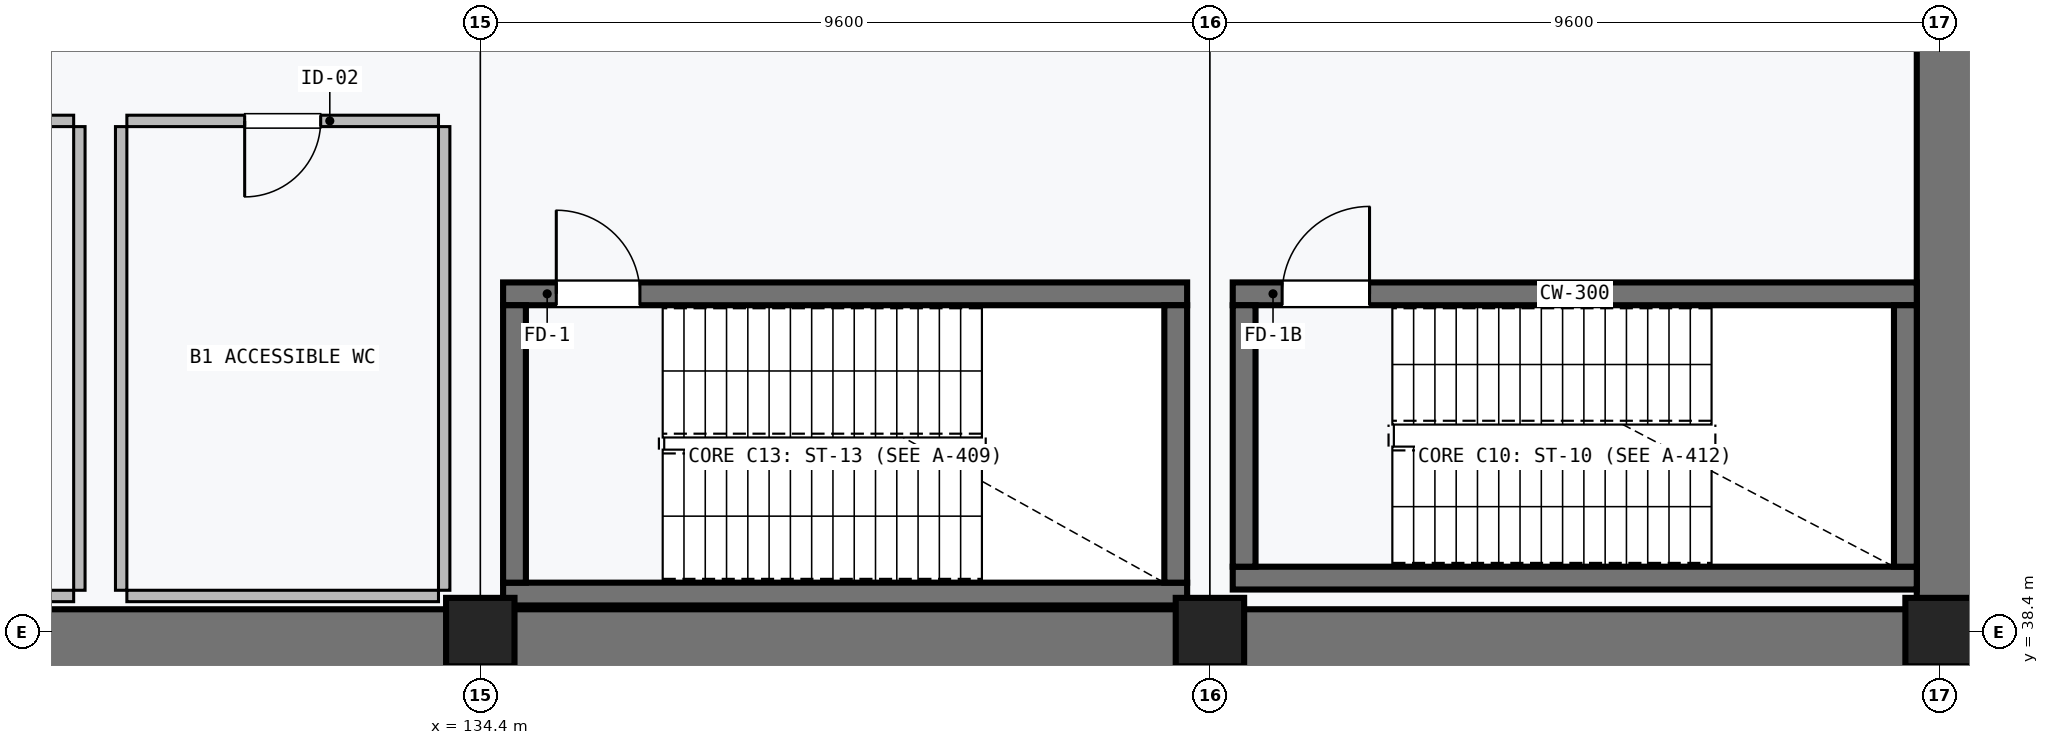
"""IFC4 building model, lengths in metres.
Left out: names, types, materials, properties, quantities, classifications, styles, units other than length and angle.
Written with IfcOpenShell. Run it as: python <this file> out.ifc"""

import sys

from ifc_helpers import new_model, si_unit, direction, frame, frame_2d, origin, origin_2d, place, context, subcontext, project, spatial, rectangle, extrude, element, fill, save


model = new_model("IFC4")
c1 = context("Model", 3, precision=1e-05, world=origin(), true_north=direction((0.0, 1.0)))
c2 = subcontext(c1, "Body", "Model", "MODEL_VIEW")
j1 = project(units=[si_unit("LENGTHUNIT", "METRE"), si_unit("PLANEANGLEUNIT", "RADIAN")], contexts=[c1])
p1 = place(None, origin())
s1 = spatial("IfcSite", under=j1, at=p1, CompositionType="ELEMENT")
p2 = place(p1, origin())
s2 = spatial("IfcBuilding", under=s1, at=p2, CompositionType="ELEMENT")
p3 = place(p2, frame((0.0, 0.0, -5.4)))
s3 = spatial("IfcBuildingStorey", under=s2, at=p3, CompositionType="ELEMENT", Elevation=-5.4)
p4 = place(p3, frame((153.7, 76.9, 0.0), z_axis=(0.0, 0.0, 1.0), x_axis=(0.0, -1.0, 0.0)))
e1 = element("IfcWall", 1, at=p4, inside=s3, PredefinedType="SOLIDWALL", context=c2, shape_type="SweptSolid", body=[
    extrude(rectangle(XDim=38.6, YDim=0.8, at=frame_2d((19.3, 0.0))), origin(), (0.0, 0.0, 1.0), 5.0),
])
p5 = place(p3, frame((153.7, 38.3, 0.0), z_axis=(0.0, 0.0, 1.0), x_axis=(-1.0, 0.0, 0.0)))
e2 = element("IfcWall", 2, at=p5, inside=s3, PredefinedType="SOLIDWALL", context=c2, shape_type="SweptSolid", body=[
    extrude(rectangle(XDim=96.0, YDim=0.8, at=frame_2d((48.0, 0.0))), origin(), (0.0, 0.0, 1.0), 5.0),
])
for number, where, z_axis, x_axis in (
    (3, (134.4, 38.4, 0.0), (0.0, 0.0, 1.0), (1.0, 0.0, 0.0)),
    (4, (144.0, 38.4, 0.0), (0.0, 0.0, 1.0), (1.0, 0.0, 0.0)),
    (5, (153.6, 38.4, 0.0), (0.0, 0.0, 1.0), (1.0, 0.0, 0.0)),
):
    element("IfcColumn", number, at=place(p3, frame(where, z_axis=z_axis, x_axis=x_axis)), inside=s3, PredefinedType="COLUMN", context=c2, shape_type="SweptSolid", body=[
        extrude(rectangle(XDim=0.9, YDim=0.9, at=origin_2d()), origin(), (0.0, 0.0, 1.0), 5.0),
    ])
p6 = place(p3, frame((144.3, 39.11, 0.0), z_axis=(0.0, 0.0, 1.0), x_axis=(1.0, 0.0, 0.0)))
e6 = element("IfcWall", 6, at=p6, inside=s3, PredefinedType="SHEAR", context=c2, shape_type="SweptSolid", body=[
    extrude(rectangle(XDim=9.0, YDim=0.3, at=frame_2d((4.5, 0.0))), origin(), (0.0, 0.0, 1.0), 5.0),
])
p7 = place(p3, frame((153.3, 42.85, 0.0), z_axis=(0.0, 0.0, 1.0), x_axis=(-1.0, 0.0, 0.0)))
e7 = element("IfcWall", 7, at=p7, inside=s3, PredefinedType="SHEAR", context=c2, shape_type="SweptSolid", body=[
    extrude(rectangle(XDim=9.0, YDim=0.3, at=frame_2d((4.5, 0.0))), origin(), (0.0, 0.0, 1.0), 5.0),
])
p8 = place(p7, frame((7.2, 0.0, 0.0)))
e8 = element("IfcOpeningElement", 8, at=p8, cuts=e7, PredefinedType="OPENING", context=c2, shape_type="SweptSolid", body=[
    extrude(rectangle(XDim=1.15, YDim=2.15, at=frame_2d((0.575, 1.075))), frame((0.0, 0.16, 0.0), z_axis=(0.0, -1.0, 0.0), x_axis=(1.0, 0.0, 0.0)), (0.0, 0.0, 1.0), 0.32),
])
for number, where, z_axis, x_axis in (
    (9, (144.45, 39.26, 0.0), (0.0, 0.0, 1.0), (0.0, 1.0, 0.0)),
    (10, (153.15, 42.7, 0.0), (0.0, 0.0, 1.0), (0.0, -1.0, 0.0)),
):
    element("IfcWall", number, at=place(p3, frame(where, z_axis=z_axis, x_axis=x_axis)), inside=s3, PredefinedType="SHEAR", context=c2, shape_type="SweptSolid", body=[
        extrude(rectangle(XDim=3.44, YDim=0.3, at=frame_2d((1.72, 0.0))), origin(), (0.0, 0.0, 1.0), 5.0),
    ])
p9 = place(p3, frame((134.7, 38.9, 0.0), z_axis=(0.0, 0.0, 1.0), x_axis=(1.0, 0.0, 0.0)))
e11 = element("IfcWall", 11, at=p9, inside=s3, PredefinedType="SHEAR", context=c2, shape_type="SweptSolid", body=[
    extrude(rectangle(XDim=9.0, YDim=0.3, at=frame_2d((4.5, 0.0))), origin(), (0.0, 0.0, 1.0), 5.0),
])
p10 = place(p3, frame((143.7, 42.85, 0.0), z_axis=(0.0, 0.0, 1.0), x_axis=(-1.0, 0.0, 0.0)))
e12 = element("IfcWall", 12, at=p10, inside=s3, PredefinedType="SHEAR", context=c2, shape_type="SweptSolid", body=[
    extrude(rectangle(XDim=9.0, YDim=0.3, at=frame_2d((4.5, 0.0))), origin(), (0.0, 0.0, 1.0), 5.0),
])
p11 = place(p10, frame((7.2, 0.0, 0.0)))
e13 = element("IfcOpeningElement", 13, at=p11, cuts=e12, PredefinedType="OPENING", context=c2, shape_type="SweptSolid", body=[
    extrude(rectangle(XDim=1.1, YDim=2.15, at=frame_2d((0.55, 1.075))), frame((0.0, 0.16, 0.0), z_axis=(0.0, -1.0, 0.0), x_axis=(1.0, 0.0, 0.0)), (0.0, 0.0, 1.0), 0.32),
])
for number, where, z_axis, x_axis in (
    (14, (134.85, 39.05, 0.0), (0.0, 0.0, 1.0), (0.0, 1.0, 0.0)),
    (15, (143.55, 42.7, 0.0), (0.0, 0.0, 1.0), (0.0, -1.0, 0.0)),
):
    element("IfcWall", number, at=place(p3, frame(where, z_axis=z_axis, x_axis=x_axis)), inside=s3, PredefinedType="SHEAR", context=c2, shape_type="SweptSolid", body=[
        extrude(rectangle(XDim=3.65, YDim=0.3, at=frame_2d((1.825, 0.0))), origin(), (0.0, 0.0, 1.0), 5.0),
    ])
p12 = place(p3, frame((129.05, 38.875, 0.0), z_axis=(0.0, 0.0, 1.0), x_axis=(-1.0, 0.0, 0.0)))
e16 = element("IfcWall", 16, at=p12, inside=s3, PredefinedType="PLUMBINGWALL", context=c2, shape_type="SweptSolid", body=[
    extrude(rectangle(XDim=13.3, YDim=0.15, at=frame_2d((6.65, 0.0))), origin(), (0.0, 0.0, 1.0), 3.99),
])
p13 = place(p3, frame((115.75, 45.125, 0.0), z_axis=(0.0, 0.0, 1.0), x_axis=(1.0, 0.0, 0.0)))
e17 = element("IfcWall", 17, at=p13, inside=s3, PredefinedType="PLUMBINGWALL", context=c2, shape_type="SweptSolid", body=[
    extrude(rectangle(XDim=13.3, YDim=0.15, at=frame_2d((6.65, 0.0))), origin(), (0.0, 0.0, 1.0), 3.99),
])
p14 = place(p13, frame((6.15, 0.0, 0.0)))
e18 = element("IfcOpeningElement", 18, at=p14, cuts=e17, PredefinedType="OPENING", context=c2, shape_type="SweptSolid", body=[
    extrude(rectangle(XDim=1.0, YDim=2.15, at=frame_2d((0.5, 1.075))), frame((0.0, 0.085, 0.0), z_axis=(0.0, -1.0, 0.0), x_axis=(1.0, 0.0, 0.0)), (0.0, 0.0, 1.0), 0.17),
])
p15 = place(p3, frame((129.125, 45.05, 0.0), z_axis=(0.0, 0.0, 1.0), x_axis=(0.0, -1.0, 0.0)))
e19 = element("IfcWall", 19, at=p15, inside=s3, PredefinedType="PLUMBINGWALL", context=c2, shape_type="SweptSolid", body=[
    extrude(rectangle(XDim=6.1, YDim=0.15, at=frame_2d((3.05, 0.0))), origin(), (0.0, 0.0, 1.0), 4.38),
])
p16 = place(p3, frame((133.85, 38.875, 0.0), z_axis=(0.0, 0.0, 1.0), x_axis=(-1.0, 0.0, 0.0)))
e20 = element("IfcWall", 20, at=p16, inside=s3, PredefinedType="PLUMBINGWALL", context=c2, shape_type="SweptSolid", body=[
    extrude(rectangle(XDim=4.1, YDim=0.15, at=frame_2d((2.05, 0.0))), origin(), (0.0, 0.0, 1.0), 4.38),
])
p17 = place(p3, frame((129.75, 45.125, 0.0), z_axis=(0.0, 0.0, 1.0), x_axis=(1.0, 0.0, 0.0)))
e21 = element("IfcWall", 21, at=p17, inside=s3, PredefinedType="PLUMBINGWALL", context=c2, shape_type="SweptSolid", body=[
    extrude(rectangle(XDim=4.1, YDim=0.15, at=frame_2d((2.05, 0.0))), origin(), (0.0, 0.0, 1.0), 4.38),
])
p18 = place(p17, frame((1.55, 0.0, 0.0)))
e22 = element("IfcOpeningElement", 22, at=p18, cuts=e21, PredefinedType="OPENING", context=c2, shape_type="SweptSolid", body=[
    extrude(rectangle(XDim=1.0, YDim=2.15, at=frame_2d((0.5, 1.075))), frame((0.0, 0.085, 0.0), z_axis=(0.0, -1.0, 0.0), x_axis=(1.0, 0.0, 0.0)), (0.0, 0.0, 1.0), 0.17),
])
for number, where, z_axis, x_axis in (
    (23, (129.675, 38.95, 0.0), (0.0, 0.0, 1.0), (0.0, 1.0, 0.0)),
    (24, (133.925, 45.05, 0.0), (0.0, 0.0, 1.0), (0.0, -1.0, 0.0)),
):
    element("IfcWall", number, at=place(p3, frame(where, z_axis=z_axis, x_axis=x_axis)), inside=s3, PredefinedType="PLUMBINGWALL", context=c2, shape_type="SweptSolid", body=[
        extrude(rectangle(XDim=6.1, YDim=0.15, at=frame_2d((3.05, 0.0))), origin(), (0.0, 0.0, 1.0), 4.38),
    ])
p19 = place(p8, frame((1.15, 0.0, 0.0), z_axis=(0.0, 0.0, 1.0), x_axis=(-1.0, 0.0, 0.0)))
e25 = element("IfcDoor", 25, at=p19, inside=s3, OperationType="SINGLE_SWING_LEFT", PredefinedType="DOOR", context=c2, shape_type="SweptSolid", body=[
    extrude(rectangle(XDim=1.15, YDim=2.15, at=frame_2d((0.575, 1.075))), frame((0.0, 0.025, 0.0), z_axis=(0.0, -1.0, 0.0), x_axis=(1.0, 0.0, 0.0)), (0.0, 0.0, 1.0), 0.05),
])
fill(e8, e25)
p20 = place(p11, frame((1.1, 0.0, 0.0), z_axis=(0.0, 0.0, 1.0), x_axis=(-1.0, 0.0, 0.0)))
e26 = element("IfcDoor", 26, at=p20, inside=s3, OperationType="SINGLE_SWING_RIGHT", PredefinedType="DOOR", context=c2, shape_type="SweptSolid", body=[
    extrude(rectangle(XDim=1.1, YDim=2.15, at=frame_2d((0.55, 1.075))), frame((0.0, 0.025, 0.0), z_axis=(0.0, -1.0, 0.0), x_axis=(1.0, 0.0, 0.0)), (0.0, 0.0, 1.0), 0.05),
])
fill(e13, e26)
p21 = place(p18, frame((1.0, 0.0, 0.0), z_axis=(0.0, 0.0, 1.0), x_axis=(-1.0, 0.0, 0.0)))
e27 = element("IfcDoor", 27, at=p21, inside=s3, OperationType="SINGLE_SWING_LEFT", PredefinedType="DOOR", context=c2, shape_type="SweptSolid", body=[
    extrude(rectangle(XDim=1.0, YDim=2.15, at=frame_2d((0.5, 1.075))), frame((0.0, 0.025, 0.0), z_axis=(0.0, -1.0, 0.0), x_axis=(1.0, 0.0, 0.0)), (0.0, 0.0, 1.0), 0.05),
])
fill(e22, e27)
save(model, sys.argv[1])
